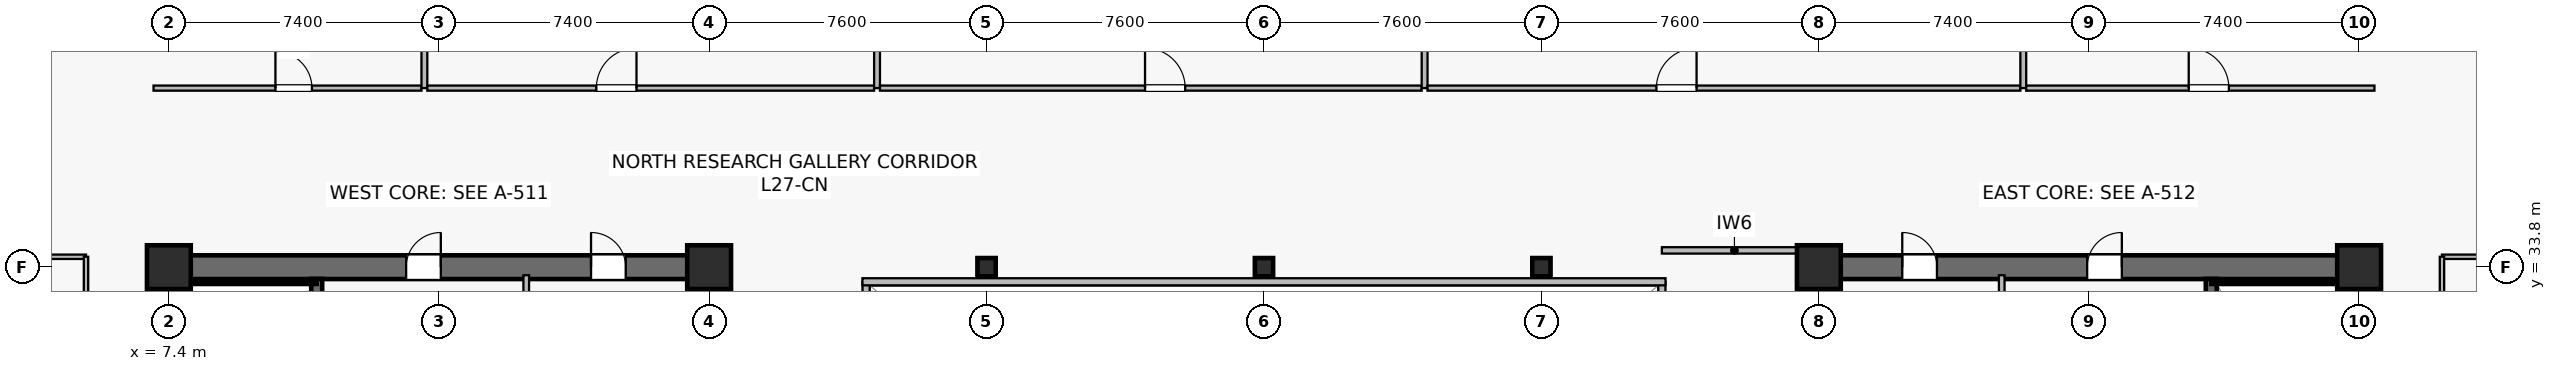
"""IFC4 building model, lengths in metres.
Left out: names, types, materials, properties, quantities, classifications, styles, units other than length and angle.
Written with IfcOpenShell. Run it as: python <this file> out.ifc"""

import sys

from ifc_helpers import new_model, si_unit, direction, frame, frame_2d, origin, origin_2d, place, context, subcontext, project, spatial, rectangle, hollow_rectangle, extrude, source, transform, mapped, element, fill, save


model = new_model("IFC4")
c1 = context("Model", 3, precision=1e-05, world=origin(), true_north=direction((0.0, 1.0)))
c2 = subcontext(c1, "Body", "Model", "MODEL_VIEW")
j1 = project(units=[si_unit("LENGTHUNIT", "METRE"), si_unit("PLANEANGLEUNIT", "RADIAN")], contexts=[c1])
p1 = place(None, origin())
s1 = spatial("IfcSite", under=j1, at=p1, CompositionType="ELEMENT")
p2 = place(p1, origin())
s2 = spatial("IfcBuilding", under=s1, at=p2, CompositionType="ELEMENT")
p3 = place(p2, frame((0.0, 0.0, 113.3)))
s3 = spatial("IfcBuildingStorey", under=s2, at=p3, CompositionType="ELEMENT", Elevation=113.3)
p4 = place(p3, frame((7.075, 33.8, 0.0), z_axis=(0.0, 0.0, 1.0), x_axis=(1.0, 0.0, 0.0)))
e1 = element("IfcWall", 1, at=p4, inside=s3, PredefinedType="SHEAR", context=c2, shape_type="SweptSolid", body=[
    extrude(rectangle(XDim=15.45, YDim=0.65, at=frame_2d((7.725, 0.0))), origin(), (0.0, 0.0, 1.0), 3.79),
])
p5 = place(p4, frame((6.825, 0.0, 0.0)))
e2 = element("IfcOpeningElement", 2, at=p5, cuts=e1, PredefinedType="OPENING", context=c2, shape_type="SweptSolid", body=[
    extrude(rectangle(XDim=0.95, YDim=2.15, at=frame_2d((0.475, 1.075))), frame((0.0, 0.335, 0.0), z_axis=(0.0, -1.0, 0.0), x_axis=(1.0, 0.0, 0.0)), (0.0, 0.0, 1.0), 0.67),
])
p6 = place(p4, frame((11.89, 0.0, 0.0)))
e3 = element("IfcOpeningElement", 3, at=p6, cuts=e1, PredefinedType="OPENING", context=c2, shape_type="SweptSolid", body=[
    extrude(rectangle(XDim=0.95, YDim=2.15, at=frame_2d((0.475, 1.075))), frame((0.0, 0.335, 0.0), z_axis=(0.0, -1.0, 0.0), x_axis=(1.0, 0.0, 0.0)), (0.0, 0.0, 1.0), 0.67),
])
p7 = place(p3, frame((7.4, 15.125, 0.0), z_axis=(0.0, 0.0, 1.0), x_axis=(0.0, 1.0, 0.0)))
e4 = element("IfcWall", 4, at=p7, inside=s3, PredefinedType="SHEAR", context=c2, shape_type="SweptSolid", body=[
    extrude(rectangle(XDim=18.35, YDim=0.65, at=frame_2d((9.175, 0.0))), origin(), (0.0, 0.0, 1.0), 3.79),
])
p8 = place(p3, frame((22.2, 15.125, 0.0), z_axis=(0.0, 0.0, 1.0), x_axis=(0.0, 1.0, 0.0)))
e5 = element("IfcWall", 5, at=p8, inside=s3, PredefinedType="SHEAR", context=c2, shape_type="SweptSolid", body=[
    extrude(rectangle(XDim=18.35, YDim=0.65, at=frame_2d((9.175, 0.0))), origin(), (0.0, 0.0, 1.0), 3.79),
])
p9 = place(p8, frame((3.425, 0.0, 0.0)))
e6 = element("IfcOpeningElement", 6, at=p9, cuts=e5, PredefinedType="OPENING", context=c2, shape_type="SweptSolid", body=[
    extrude(rectangle(XDim=1.42, YDim=2.2, at=frame_2d((0.71, 1.1))), frame((0.0, 0.335, 0.0), z_axis=(0.0, -1.0, 0.0), x_axis=(1.0, 0.0, 0.0)), (0.0, 0.0, 1.0), 0.67),
])
p10 = place(p3, frame((11.45, 24.85, 0.0), z_axis=(0.0, 0.0, 1.0), x_axis=(0.0, 1.0, 0.0)))
e7 = element("IfcWall", 7, at=p10, inside=s3, PredefinedType="SHEAR", context=c2, shape_type="SweptSolid", body=[
    extrude(rectangle(XDim=8.63, YDim=0.3, at=frame_2d((4.315, 0.0))), origin(), (0.0, 0.0, 1.0), 3.79),
])
p11 = place(p10, frame((0.42, 0.0, 0.0)))
e8 = element("IfcOpeningElement", 8, at=p11, cuts=e7, PredefinedType="OPENING", context=c2, shape_type="SweptSolid", body=[
    extrude(rectangle(XDim=1.1, YDim=2.15, at=frame_2d((0.55, 1.075))), frame((0.0, 0.16, 0.0), z_axis=(0.0, -1.0, 0.0), x_axis=(1.0, 0.0, 0.0)), (0.0, 0.0, 1.0), 0.32),
])
p12 = place(p3, frame((7.73, 33.4, 0.0), z_axis=(0.0, 0.0, 1.0), x_axis=(1.0, 0.0, 0.0)))
e9 = element("IfcWall", 9, at=p12, inside=s3, PredefinedType="SOLIDWALL", context=c2, shape_type="SweptSolid", body=[
    extrude(rectangle(XDim=3.72, YDim=0.12, at=frame_2d((1.86, 0.0))), origin(), (0.0, 0.0, 1.0), 3.79),
])
p13 = place(p3, frame((7.73, 25.0, 0.0), z_axis=(0.0, 0.0, 1.0), x_axis=(0.0, 1.0, 0.0)))
e10 = element("IfcWall", 10, at=p13, inside=s3, PredefinedType="SOLIDWALL", context=c2, shape_type="SweptSolid", body=[
    extrude(rectangle(XDim=8.32, YDim=0.12, at=frame_2d((4.16, 0.0))), origin(), (0.0, 0.0, 1.0), 3.79),
])
p14 = place(p3, frame((52.275, 33.8, 0.0), z_axis=(0.0, 0.0, 1.0), x_axis=(1.0, 0.0, 0.0)))
e11 = element("IfcWall", 11, at=p14, inside=s3, PredefinedType="SHEAR", context=c2, shape_type="SweptSolid", body=[
    extrude(rectangle(XDim=15.45, YDim=0.65, at=frame_2d((7.725, 0.0))), origin(), (0.0, 0.0, 1.0), 3.79),
])
p15 = place(p14, frame((7.675, 0.0, 0.0)))
e12 = element("IfcOpeningElement", 12, at=p15, cuts=e11, PredefinedType="OPENING", context=c2, shape_type="SweptSolid", body=[
    extrude(rectangle(XDim=0.95, YDim=2.15, at=frame_2d((0.475, 1.075))), frame((0.0, 0.335, 0.0), z_axis=(0.0, -1.0, 0.0), x_axis=(1.0, 0.0, 0.0)), (0.0, 0.0, 1.0), 0.67),
])
p16 = place(p14, frame((2.61, 0.0, 0.0)))
e13 = element("IfcOpeningElement", 13, at=p16, cuts=e11, PredefinedType="OPENING", context=c2, shape_type="SweptSolid", body=[
    extrude(rectangle(XDim=0.95, YDim=2.15, at=frame_2d((0.475, 1.075))), frame((0.0, 0.335, 0.0), z_axis=(0.0, -1.0, 0.0), x_axis=(1.0, 0.0, 0.0)), (0.0, 0.0, 1.0), 0.67),
])
p17 = place(p3, frame((52.6, 15.125, 0.0), z_axis=(0.0, 0.0, 1.0), x_axis=(0.0, 1.0, 0.0)))
e14 = element("IfcWall", 14, at=p17, inside=s3, PredefinedType="SHEAR", context=c2, shape_type="SweptSolid", body=[
    extrude(rectangle(XDim=18.35, YDim=0.65, at=frame_2d((9.175, 0.0))), origin(), (0.0, 0.0, 1.0), 3.79),
])
p18 = place(p17, frame((3.425, 0.0, 0.0)))
e15 = element("IfcOpeningElement", 15, at=p18, cuts=e14, PredefinedType="OPENING", context=c2, shape_type="SweptSolid", body=[
    extrude(rectangle(XDim=1.42, YDim=2.2, at=frame_2d((0.71, 1.1))), frame((0.0, 0.335, 0.0), z_axis=(0.0, -1.0, 0.0), x_axis=(1.0, 0.0, 0.0)), (0.0, 0.0, 1.0), 0.67),
])
p19 = place(p3, frame((67.4, 15.125, 0.0), z_axis=(0.0, 0.0, 1.0), x_axis=(0.0, 1.0, 0.0)))
e16 = element("IfcWall", 16, at=p19, inside=s3, PredefinedType="SHEAR", context=c2, shape_type="SweptSolid", body=[
    extrude(rectangle(XDim=18.35, YDim=0.65, at=frame_2d((9.175, 0.0))), origin(), (0.0, 0.0, 1.0), 3.79),
])
p20 = place(p3, frame((63.35, 24.85, 0.0), z_axis=(0.0, 0.0, 1.0), x_axis=(0.0, 1.0, 0.0)))
e17 = element("IfcWall", 17, at=p20, inside=s3, PredefinedType="SHEAR", context=c2, shape_type="SweptSolid", body=[
    extrude(rectangle(XDim=8.63, YDim=0.3, at=frame_2d((4.315, 0.0))), origin(), (0.0, 0.0, 1.0), 3.79),
])
p21 = place(p20, frame((0.42, 0.0, 0.0)))
e18 = element("IfcOpeningElement", 18, at=p21, cuts=e17, PredefinedType="OPENING", context=c2, shape_type="SweptSolid", body=[
    extrude(rectangle(XDim=1.1, YDim=2.15, at=frame_2d((0.55, 1.075))), frame((0.0, 0.16, 0.0), z_axis=(0.0, -1.0, 0.0), x_axis=(1.0, 0.0, 0.0)), (0.0, 0.0, 1.0), 0.32),
])
p22 = place(p3, frame((63.35, 33.4, 0.0), z_axis=(0.0, 0.0, 1.0), x_axis=(1.0, 0.0, 0.0)))
e19 = element("IfcWall", 19, at=p22, inside=s3, PredefinedType="SOLIDWALL", context=c2, shape_type="SweptSolid", body=[
    extrude(rectangle(XDim=3.72, YDim=0.12, at=frame_2d((1.86, 0.0))), origin(), (0.0, 0.0, 1.0), 3.79),
])
p23 = place(p3, frame((67.07, 25.0, 0.0), z_axis=(0.0, 0.0, 1.0), x_axis=(0.0, 1.0, 0.0)))
e20 = element("IfcWall", 20, at=p23, inside=s3, PredefinedType="SOLIDWALL", context=c2, shape_type="SweptSolid", body=[
    extrude(rectangle(XDim=8.32, YDim=0.12, at=frame_2d((4.16, 0.0))), origin(), (0.0, 0.0, 1.0), 3.79),
])
m1 = source(origin(), c2, "Body", "SweptSolid", [
    extrude(rectangle(XDim=1.2, YDim=1.2, at=origin_2d()), origin(), (0.0, 0.0, 1.0), 4.1),
])
for number, where, z_axis, x_axis in (
    (21, (7.4, 33.8, 0.0), (0.0, 0.0, 1.0), (1.0, 0.0, 0.0)),
    (22, (22.2, 33.8, 0.0), (0.0, 0.0, 1.0), (1.0, 0.0, 0.0)),
    (23, (52.6, 33.8, 0.0), (0.0, 0.0, 1.0), (1.0, 0.0, 0.0)),
    (24, (67.4, 33.8, 0.0), (0.0, 0.0, 1.0), (1.0, 0.0, 0.0)),
):
    element("IfcColumn", number, at=place(p3, frame(where, z_axis=z_axis, x_axis=x_axis)), inside=s3, PredefinedType="COLUMN", context=c2, shape_type="MappedRepresentation", body=[
        mapped(m1, transform((0.0, 0.0, 0.0), scale=1.0)),
    ])
m2 = source(origin(), c2, "Body", "SweptSolid", [
    extrude(hollow_rectangle(XDim=0.5, YDim=0.5, WallThickness=0.022, at=origin_2d()), origin(), (0.0, 0.0, 1.0), 4.1),
])
for number, where, z_axis, x_axis in (
    (25, (29.8, 33.8, 0.0), (0.0, 0.0, 1.0), (1.0, 0.0, 0.0)),
    (26, (37.4, 33.8, 0.0), (0.0, 0.0, 1.0), (1.0, 0.0, 0.0)),
    (27, (45.0, 33.8, 0.0), (0.0, 0.0, 1.0), (1.0, 0.0, 0.0)),
):
    element("IfcColumn", number, at=place(p3, frame(where, z_axis=z_axis, x_axis=x_axis)), inside=s3, PredefinedType="COLUMN", context=c2, shape_type="MappedRepresentation", body=[
        mapped(m2, transform((0.0, 0.0, 0.0), scale=1.0)),
    ])
for number, where, z_axis, x_axis in (
    (28, (17.19, 29.65, 0.0), (0.0, 0.0, 1.0), (0.0, 1.0, 0.0)),
    (29, (57.61, 29.65, 0.0), (0.0, 0.0, 1.0), (0.0, 1.0, 0.0)),
):
    element("IfcWall", number, at=place(p3, frame(where, z_axis=z_axis, x_axis=x_axis)), inside=s3, PredefinedType="PLUMBINGWALL", context=c2, shape_type="SweptSolid", body=[
        extrude(rectangle(XDim=3.93, YDim=0.155, at=frame_2d((1.965, 0.0))), origin(), (0.0, 0.0, 1.0), 3.79),
    ])
p24 = place(p3, frame((48.3, 34.26, 0.0), z_axis=(0.0, 0.0, 1.0), x_axis=(1.0, 0.0, 0.0)))
e30 = element("IfcWall", 30, at=p24, inside=s3, PredefinedType="PARTITIONING", context=c2, shape_type="SweptSolid", body=[
    extrude(rectangle(XDim=3.975, YDim=0.175, at=frame_2d((1.987, 0.0))), origin(), (0.0, 0.0, 1.0), 3.475),
])
p25 = place(p3, frame((26.5, 15.2, 0.0), z_axis=(0.0, 0.0, 1.0), x_axis=(0.0, 1.0, 0.0)))
e31 = element("IfcWall", 31, at=p25, inside=s3, PredefinedType="SOLIDWALL", context=c2, shape_type="SweptSolid", body=[
    extrude(rectangle(XDim=18.2, YDim=0.195, at=frame_2d((9.1, 0.0))), origin(), (0.0, 0.0, 1.0), 3.79),
])
p26 = place(p25, frame((1.8, 0.0, 0.9)))
e32 = element("IfcOpeningElement", 32, at=p26, cuts=e31, PredefinedType="OPENING", context=c2, shape_type="SweptSolid", body=[
    extrude(rectangle(XDim=1.2, YDim=1.35, at=frame_2d((0.6, 0.675))), frame((0.0, 0.107, 0.0), z_axis=(0.0, -1.0, 0.0), x_axis=(1.0, 0.0, 0.0)), (0.0, 0.0, 1.0), 0.215),
])
p27 = place(p25, frame((13.2, 0.0, 0.9)))
e33 = element("IfcOpeningElement", 33, at=p27, cuts=e31, PredefinedType="OPENING", context=c2, shape_type="SweptSolid", body=[
    extrude(rectangle(XDim=1.2, YDim=1.35, at=frame_2d((0.6, 0.675))), frame((0.0, 0.107, 0.0), z_axis=(0.0, -1.0, 0.0), x_axis=(1.0, 0.0, 0.0)), (0.0, 0.0, 1.0), 0.215),
])
p28 = place(p3, frame((48.3, 15.2, 0.0), z_axis=(0.0, 0.0, 1.0), x_axis=(0.0, 1.0, 0.0)))
e34 = element("IfcWall", 34, at=p28, inside=s3, PredefinedType="SOLIDWALL", context=c2, shape_type="SweptSolid", body=[
    extrude(rectangle(XDim=18.2, YDim=0.195, at=frame_2d((9.1, 0.0))), origin(), (0.0, 0.0, 1.0), 3.79),
])
p29 = place(p28, frame((1.8, 0.0, 0.9)))
e35 = element("IfcOpeningElement", 35, at=p29, cuts=e34, PredefinedType="OPENING", context=c2, shape_type="SweptSolid", body=[
    extrude(rectangle(XDim=1.2, YDim=1.35, at=frame_2d((0.6, 0.675))), frame((0.0, 0.107, 0.0), z_axis=(0.0, -1.0, 0.0), x_axis=(1.0, 0.0, 0.0)), (0.0, 0.0, 1.0), 0.215),
])
p30 = place(p28, frame((13.2, 0.0, 0.9)))
e36 = element("IfcOpeningElement", 36, at=p30, cuts=e34, PredefinedType="OPENING", context=c2, shape_type="SweptSolid", body=[
    extrude(rectangle(XDim=1.2, YDim=1.35, at=frame_2d((0.6, 0.675))), frame((0.0, 0.107, 0.0), z_axis=(0.0, -1.0, 0.0), x_axis=(1.0, 0.0, 0.0)), (0.0, 0.0, 1.0), 0.215),
])
p31 = place(p3, frame((26.4, 33.4, 0.0), z_axis=(0.0, 0.0, 1.0), x_axis=(1.0, 0.0, 0.0)))
e37 = element("IfcWall", 37, at=p31, inside=s3, PredefinedType="SOLIDWALL", context=c2, shape_type="SweptSolid", body=[
    extrude(rectangle(XDim=22.0, YDim=0.195, at=frame_2d((11.0, 0.0))), origin(), (0.0, 0.0, 1.0), 3.79),
])
p32 = place(p3, frame((6.98, 38.705, 0.0), z_axis=(0.0, 0.0, 1.0), x_axis=(1.0, 0.0, 0.0)))
e38 = element("IfcWall", 38, at=p32, inside=s3, PredefinedType="PARTITIONING", context=c2, shape_type="SweptSolid", body=[
    extrude(rectangle(XDim=7.34, YDim=0.14, at=frame_2d((3.67, 0.0))), origin(), (0.0, 0.0, 1.0), 3.275),
])
p33 = place(p32, frame((3.339, 0.0, 0.0)))
e39 = element("IfcOpeningElement", 39, at=p33, cuts=e38, PredefinedType="OPENING", context=c2, shape_type="SweptSolid", body=[
    extrude(rectangle(XDim=1.0, YDim=2.15, at=frame_2d((0.5, 1.075))), frame((0.0, 0.08, 0.0), z_axis=(0.0, -1.0, 0.0), x_axis=(1.0, 0.0, 0.0)), (0.0, 0.0, 1.0), 0.16),
])
p34 = place(p3, frame((14.4, 38.705, 0.0), z_axis=(0.0, 0.0, 1.0), x_axis=(0.0, 1.0, 0.0)))
e40 = element("IfcWall", 40, at=p34, inside=s3, PredefinedType="PARTITIONING", context=c2, shape_type="SweptSolid", body=[
    extrude(rectangle(XDim=8.485, YDim=0.16, at=frame_2d((4.242, 0.0))), origin(), (0.0, 0.0, 1.0), 3.075),
])
p35 = place(p3, frame((14.48, 38.705, 0.0), z_axis=(0.0, 0.0, 1.0), x_axis=(1.0, 0.0, 0.0)))
e41 = element("IfcWall", 41, at=p35, inside=s3, PredefinedType="PARTITIONING", context=c2, shape_type="SweptSolid", body=[
    extrude(rectangle(XDim=12.24, YDim=0.14, at=frame_2d((6.12, 0.0))), origin(), (0.0, 0.0, 1.0), 3.125),
])
p36 = place(p35, frame((4.63, 0.0, 0.0)))
e42 = element("IfcOpeningElement", 42, at=p36, cuts=e41, PredefinedType="OPENING", context=c2, shape_type="SweptSolid", body=[
    extrude(rectangle(XDim=1.1, YDim=2.18, at=frame_2d((0.55, 1.09))), frame((0.0, 0.08, 0.0), z_axis=(0.0, -1.0, 0.0), x_axis=(1.0, 0.0, 0.0)), (0.0, 0.0, 1.0), 0.16),
])
p37 = place(p3, frame((26.8, 38.705, 0.0), z_axis=(0.0, 0.0, 1.0), x_axis=(0.0, 1.0, 0.0)))
e43 = element("IfcWall", 43, at=p37, inside=s3, PredefinedType="PARTITIONING", context=c2, shape_type="SweptSolid", body=[
    extrude(rectangle(XDim=7.285, YDim=0.16, at=frame_2d((3.643, 0.0))), origin(), (0.0, 0.0, 1.0), 3.075),
])
p38 = place(p3, frame((26.88, 38.705, 0.0), z_axis=(0.0, 0.0, 1.0), x_axis=(1.0, 0.0, 0.0)))
e44 = element("IfcWall", 44, at=p38, inside=s3, PredefinedType="PARTITIONING", context=c2, shape_type="SweptSolid", body=[
    extrude(rectangle(XDim=14.84, YDim=0.14, at=frame_2d((7.42, 0.0))), origin(), (0.0, 0.0, 1.0), 3.125),
])
p39 = place(p38, frame((7.261, 0.0, 0.0)))
e45 = element("IfcOpeningElement", 45, at=p39, cuts=e44, PredefinedType="OPENING", context=c2, shape_type="SweptSolid", body=[
    extrude(rectangle(XDim=1.1, YDim=2.18, at=frame_2d((0.55, 1.09))), frame((0.0, 0.08, 0.0), z_axis=(0.0, -1.0, 0.0), x_axis=(1.0, 0.0, 0.0)), (0.0, 0.0, 1.0), 0.16),
])
p40 = place(p3, frame((41.8, 38.705, 0.0), z_axis=(0.0, 0.0, 1.0), x_axis=(0.0, 1.0, 0.0)))
e46 = element("IfcWall", 46, at=p40, inside=s3, PredefinedType="PARTITIONING", context=c2, shape_type="SweptSolid", body=[
    extrude(rectangle(XDim=7.285, YDim=0.16, at=frame_2d((3.643, 0.0))), origin(), (0.0, 0.0, 1.0), 3.075),
])
p41 = place(p3, frame((41.88, 38.705, 0.0), z_axis=(0.0, 0.0, 1.0), x_axis=(1.0, 0.0, 0.0)))
e47 = element("IfcWall", 47, at=p41, inside=s3, PredefinedType="PARTITIONING", context=c2, shape_type="SweptSolid", body=[
    extrude(rectangle(XDim=16.24, YDim=0.14, at=frame_2d((8.12, 0.0))), origin(), (0.0, 0.0, 1.0), 3.125),
])
p42 = place(p41, frame((6.271, 0.0, 0.0)))
e48 = element("IfcOpeningElement", 48, at=p42, cuts=e47, PredefinedType="OPENING", context=c2, shape_type="SweptSolid", body=[
    extrude(rectangle(XDim=1.1, YDim=2.18, at=frame_2d((0.55, 1.09))), frame((0.0, 0.08, 0.0), z_axis=(0.0, -1.0, 0.0), x_axis=(1.0, 0.0, 0.0)), (0.0, 0.0, 1.0), 0.16),
])
p43 = place(p3, frame((58.2, 38.705, 0.0), z_axis=(0.0, 0.0, 1.0), x_axis=(0.0, 1.0, 0.0)))
e49 = element("IfcWall", 49, at=p43, inside=s3, PredefinedType="PARTITIONING", context=c2, shape_type="SweptSolid", body=[
    extrude(rectangle(XDim=8.485, YDim=0.16, at=frame_2d((4.242, 0.0))), origin(), (0.0, 0.0, 1.0), 3.075),
])
p44 = place(p3, frame((58.28, 38.705, 0.0), z_axis=(0.0, 0.0, 1.0), x_axis=(1.0, 0.0, 0.0)))
e50 = element("IfcWall", 50, at=p44, inside=s3, PredefinedType="PARTITIONING", context=c2, shape_type="SweptSolid", body=[
    extrude(rectangle(XDim=9.54, YDim=0.14, at=frame_2d((4.77, 0.0))), origin(), (0.0, 0.0, 1.0), 3.125),
])
p45 = place(p44, frame((4.452, 0.0, 0.0)))
e51 = element("IfcOpeningElement", 51, at=p45, cuts=e50, PredefinedType="OPENING", context=c2, shape_type="SweptSolid", body=[
    extrude(rectangle(XDim=1.1, YDim=2.18, at=frame_2d((0.55, 1.09))), frame((0.0, 0.08, 0.0), z_axis=(0.0, -1.0, 0.0), x_axis=(1.0, 0.0, 0.0)), (0.0, 0.0, 1.0), 0.16),
])
p46 = place(p3, frame((2.11, 34.085, 0.0), z_axis=(0.0, 0.0, 1.0), x_axis=(1.0, 0.0, 0.0)))
e52 = element("IfcWall", 52, at=p46, inside=s3, PredefinedType="PARTITIONING", context=c2, shape_type="SweptSolid", body=[
    extrude(rectangle(XDim=3.02, YDim=0.12, at=frame_2d((1.51, 0.0))), origin(), (0.0, 0.0, 1.0), 3.79),
])
p47 = place(p3, frame((5.13, 28.06, 0.0), z_axis=(0.0, 0.0, 1.0), x_axis=(0.0, 1.0, 0.0)))
e53 = element("IfcWall", 53, at=p47, inside=s3, PredefinedType="PARTITIONING", context=c2, shape_type="SweptSolid", body=[
    extrude(rectangle(XDim=6.025, YDim=0.12, at=frame_2d((3.012, 0.0))), origin(), (0.0, 0.0, 1.0), 3.79),
])
p48 = place(p47, frame((2.562, 0.0, 0.0)))
e54 = element("IfcOpeningElement", 54, at=p48, cuts=e53, PredefinedType="OPENING", context=c2, shape_type="SweptSolid", body=[
    extrude(rectangle(XDim=0.9, YDim=2.1, at=frame_2d((0.45, 1.05))), frame((0.0, 0.07, 0.0), z_axis=(0.0, -1.0, 0.0), x_axis=(1.0, 0.0, 0.0)), (0.0, 0.0, 1.0), 0.14),
])
p49 = place(p3, frame((69.67, 34.085, 0.0), z_axis=(0.0, 0.0, 1.0), x_axis=(1.0, 0.0, 0.0)))
e55 = element("IfcWall", 55, at=p49, inside=s3, PredefinedType="PARTITIONING", context=c2, shape_type="SweptSolid", body=[
    extrude(rectangle(XDim=3.02, YDim=0.12, at=frame_2d((1.51, 0.0))), origin(), (0.0, 0.0, 1.0), 3.79),
])
p50 = place(p3, frame((69.67, 25.06, 0.0), z_axis=(0.0, 0.0, 1.0), x_axis=(0.0, 1.0, 0.0)))
e56 = element("IfcWall", 56, at=p50, inside=s3, PredefinedType="PARTITIONING", context=c2, shape_type="SweptSolid", body=[
    extrude(rectangle(XDim=9.025, YDim=0.12, at=frame_2d((4.512, 0.0))), origin(), (0.0, 0.0, 1.0), 3.79),
])
p51 = place(p50, frame((4.062, 0.0, 0.0)))
e57 = element("IfcOpeningElement", 57, at=p51, cuts=e56, PredefinedType="OPENING", context=c2, shape_type="SweptSolid", body=[
    extrude(rectangle(XDim=0.9, YDim=2.1, at=frame_2d((0.45, 1.05))), frame((0.0, 0.07, 0.0), z_axis=(0.0, -1.0, 0.0), x_axis=(1.0, 0.0, 0.0)), (0.0, 0.0, 1.0), 0.14),
])
m3 = source(origin(), c2, "Body", "SweptSolid", [
    extrude(rectangle(XDim=0.95, YDim=2.15, at=frame_2d((0.475, 1.075))), frame((0.0, 0.025, 0.0), z_axis=(0.0, -1.0, 0.0), x_axis=(1.0, 0.0, 0.0)), (0.0, 0.0, 1.0), 0.05),
])
p52 = place(p5, origin())
e58 = element("IfcDoor", 58, at=p52, inside=s3, OperationType="SINGLE_SWING_RIGHT", PredefinedType="DOOR", context=c2, shape_type="MappedRepresentation", body=[
    mapped(m3, transform((0.0, 0.0, 0.0), scale=1.0)),
])
fill(e2, e58)
p53 = place(p6, origin())
e59 = element("IfcDoor", 59, at=p53, inside=s3, OperationType="SINGLE_SWING_LEFT", PredefinedType="DOOR", context=c2, shape_type="MappedRepresentation", body=[
    mapped(m3, transform((0.0, 0.0, 0.0), scale=1.0)),
])
fill(e3, e59)
p54 = place(p15, origin())
e60 = element("IfcDoor", 60, at=p54, inside=s3, OperationType="SINGLE_SWING_RIGHT", PredefinedType="DOOR", context=c2, shape_type="MappedRepresentation", body=[
    mapped(m3, transform((0.0, 0.0, 0.0), scale=1.0)),
])
fill(e12, e60)
p55 = place(p16, origin())
e61 = element("IfcDoor", 61, at=p55, inside=s3, OperationType="SINGLE_SWING_LEFT", PredefinedType="DOOR", context=c2, shape_type="MappedRepresentation", body=[
    mapped(m3, transform((0.0, 0.0, 0.0), scale=1.0)),
])
fill(e13, e61)
m4 = source(origin(), c2, "Body", "SweptSolid", [
    extrude(rectangle(XDim=1.0, YDim=2.15, at=frame_2d((0.5, 1.075))), frame((0.0, 0.025, 0.0), z_axis=(0.0, -1.0, 0.0), x_axis=(1.0, 0.0, 0.0)), (0.0, 0.0, 1.0), 0.05),
])
p56 = place(p33, origin())
e62 = element("IfcDoor", 62, at=p56, inside=s3, OperationType="SINGLE_SWING_LEFT", PredefinedType="DOOR", context=c2, shape_type="MappedRepresentation", body=[
    mapped(m4, transform((0.0, 0.0, 0.0), scale=1.0)),
])
fill(e39, e62)
m5 = source(origin(), c2, "Body", "SweptSolid", [
    extrude(rectangle(XDim=1.1, YDim=2.18, at=frame_2d((0.55, 1.09))), frame((0.0, 0.025, 0.0), z_axis=(0.0, -1.0, 0.0), x_axis=(1.0, 0.0, 0.0)), (0.0, 0.0, 1.0), 0.05),
])
p57 = place(p36, origin())
e63 = element("IfcDoor", 63, at=p57, inside=s3, OperationType="SINGLE_SWING_RIGHT", PredefinedType="DOOR", context=c2, shape_type="MappedRepresentation", body=[
    mapped(m5, transform((0.0, 0.0, 0.0), scale=1.0)),
])
fill(e42, e63)
p58 = place(p39, origin())
e64 = element("IfcDoor", 64, at=p58, inside=s3, OperationType="SINGLE_SWING_LEFT", PredefinedType="DOOR", context=c2, shape_type="MappedRepresentation", body=[
    mapped(m5, transform((0.0, 0.0, 0.0), scale=1.0)),
])
fill(e45, e64)
p59 = place(p42, origin())
e65 = element("IfcDoor", 65, at=p59, inside=s3, OperationType="SINGLE_SWING_RIGHT", PredefinedType="DOOR", context=c2, shape_type="MappedRepresentation", body=[
    mapped(m5, transform((0.0, 0.0, 0.0), scale=1.0)),
])
fill(e48, e65)
p60 = place(p45, origin())
e66 = element("IfcDoor", 66, at=p60, inside=s3, OperationType="SINGLE_SWING_LEFT", PredefinedType="DOOR", context=c2, shape_type="MappedRepresentation", body=[
    mapped(m5, transform((0.0, 0.0, 0.0), scale=1.0)),
])
fill(e51, e66)
save(model, sys.argv[1])
